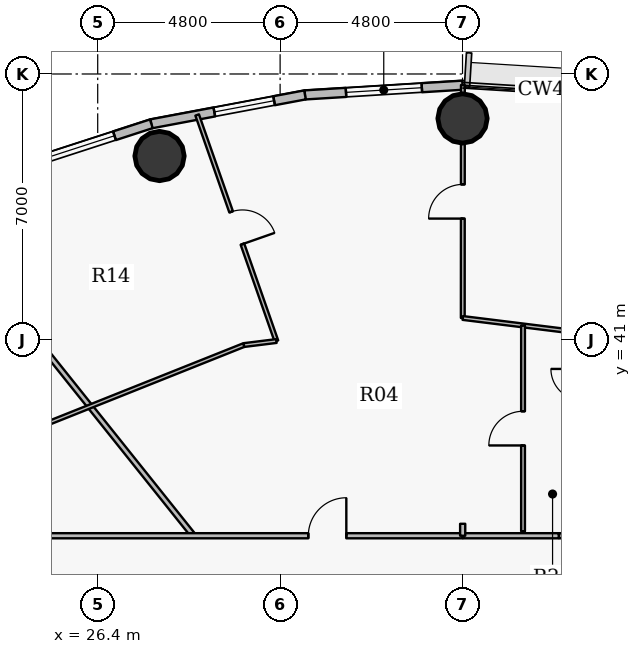
"""IFC4 building model, lengths in metres.
Left out: names, types, materials, properties, quantities, classifications, styles, units other than length and angle.
Written with IfcOpenShell. Run it as: python <this file> out.ifc"""

import sys

from ifc_helpers import new_model, si_unit, direction, frame, frame_2d, origin, origin_2d, place, context, subcontext, project, spatial, rectangle, hollow_circle, extrude, source, transform, mapped, element, fill, save


model = new_model("IFC4")
c1 = context("Model", 3, precision=1e-05, world=origin(), true_north=direction((0.0, 1.0)))
c2 = subcontext(c1, "Body", "Model", "MODEL_VIEW")
j1 = project(units=[si_unit("LENGTHUNIT", "METRE"), si_unit("PLANEANGLEUNIT", "RADIAN")], contexts=[c1])
p1 = place(None, origin())
s1 = spatial("IfcSite", under=j1, at=p1, CompositionType="ELEMENT")
p2 = place(p1, origin())
s2 = spatial("IfcBuilding", under=s1, at=p2, CompositionType="ELEMENT")
p3 = place(p2, frame((0.0, 0.0, 178.65)))
s3 = spatial("IfcBuildingStorey", under=s2, at=p3, CompositionType="ELEMENT", Elevation=178.65)
for number, where, z_axis, x_axis in (
    (1, (36.0, 46.83, 0.0), (0.0, 0.0, 1.0), (1.0, 0.0, 0.0)),
    (2, (28.027, 45.841, 0.0), (0.0, 0.0, 1.0), (1.0, 0.0, 0.0)),
):
    element("IfcColumn", number, at=place(p3, frame(where, z_axis=z_axis, x_axis=x_axis)), inside=s3, PredefinedType="COLUMN", context=c2, shape_type="SweptSolid", body=[
        extrude(hollow_circle(Radius=0.65, WallThickness=0.04, at=origin_2d()), origin(), (0.0, 0.0, 1.0), 3.75),
    ])
p4 = place(p3, frame((31.854, 47.449, 0.0), z_axis=(0.0, 0.0, 1.0), x_axis=(0.998104600619, 0.061540281305, 0.0)))
e3 = element("IfcWall", 3, at=p4, inside=s3, PredefinedType="SOLIDWALL", context=c2, shape_type="SweptSolid", body=[
    extrude(rectangle(XDim=4.154, YDim=0.24, at=frame_2d((2.077, 0.0))), origin(), (0.0, 0.0, 1.0), 3.5),
])
p5 = place(p4, frame((1.082, 0.0, 0.9)))
e4 = element("IfcOpeningElement", 4, at=p5, cuts=e3, PredefinedType="OPENING", context=c2, shape_type="SweptSolid", body=[
    extrude(rectangle(XDim=2.0, YDim=1.75, at=origin_2d()), frame((1.0, 0.13, 0.875), z_axis=(0.0, -1.0, 0.0), x_axis=(1.0, 0.0, 0.0)), (0.0, 0.0, 1.0), 0.26),
])
p6 = place(p3, frame((27.811, 46.689, 0.0), z_axis=(0.0, 0.0, 1.0), x_axis=(0.982788108205, 0.184736391573, 0.0)))
e5 = element("IfcWall", 5, at=p6, inside=s3, PredefinedType="SOLIDWALL", context=c2, shape_type="SweptSolid", body=[
    extrude(rectangle(XDim=4.114, YDim=0.24, at=frame_2d((2.057, 0.0))), origin(), (0.0, 0.0, 1.0), 3.5),
])
p7 = place(p6, frame((1.687, 0.0, 0.9)))
e6 = element("IfcOpeningElement", 6, at=p7, cuts=e5, PredefinedType="OPENING", context=c2, shape_type="SweptSolid", body=[
    extrude(rectangle(XDim=1.6, YDim=1.75, at=origin_2d()), frame((0.8, 0.13, 0.875), z_axis=(0.0, -1.0, 0.0), x_axis=(1.0, 0.0, 0.0)), (0.0, 0.0, 1.0), 0.26),
])
p8 = place(p3, frame((23.97, 45.444, 0.0), z_axis=(0.0, 0.0, 1.0), x_axis=(0.951209870236, 0.30854462038, 0.0)))
e7 = element("IfcWall", 7, at=p8, inside=s3, PredefinedType="SOLIDWALL", context=c2, shape_type="SweptSolid", body=[
    extrude(rectangle(XDim=4.038, YDim=0.24, at=frame_2d((2.019, 0.0))), origin(), (0.0, 0.0, 1.0), 3.5),
])
p9 = place(p8, frame((1.019, 0.0, 0.9)))
e8 = element("IfcOpeningElement", 8, at=p9, cuts=e7, PredefinedType="OPENING", context=c2, shape_type="SweptSolid", body=[
    extrude(rectangle(XDim=2.0, YDim=1.75, at=origin_2d()), frame((1.0, 0.13, 0.875), z_axis=(0.0, -1.0, 0.0), x_axis=(1.0, 0.0, 0.0)), (0.0, 0.0, 1.0), 0.26),
])
p10 = place(p3, frame((21.999, 44.503, 0.0), z_axis=(0.0, 0.0, 1.0), x_axis=(0.624673551917, -0.780886005468, 0.0)))
e9 = element("IfcWall", 9, at=p10, inside=s3, PredefinedType="PARTITIONING", context=c2, shape_type="SweptSolid", body=[
    extrude(rectangle(XDim=11.081, YDim=0.135, at=frame_2d((5.541, 0.0))), origin(), (0.0, 0.0, 1.0), 2.935),
])
p11 = place(p3, frame((24.35, 35.85, 0.0), z_axis=(0.0, 0.0, 1.0), x_axis=(1.0, 0.0, 0.0)))
e10 = element("IfcWall", 10, at=p11, inside=s3, PredefinedType="PARTITIONING", context=c2, shape_type="SweptSolid", body=[
    extrude(rectangle(XDim=11.654, YDim=0.135, at=frame_2d((5.827, 0.0))), origin(), (0.0, 0.0, 1.0), 2.935),
])
p12 = place(p11, frame((7.592, 0.0, 0.0)))
e11 = element("IfcOpeningElement", 11, at=p12, cuts=e10, PredefinedType="OPENING", context=c2, shape_type="SweptSolid", body=[
    extrude(rectangle(XDim=1.0, YDim=2.15, at=origin_2d()), frame((0.5, 0.078, 1.075), z_axis=(0.0, -1.0, 0.0), x_axis=(1.0, 0.0, 0.0)), (0.0, 0.0, 1.0), 0.155),
])
p13 = place(p3, frame((25.055, 38.796, 0.0), z_axis=(0.0, 0.0, 1.0), x_axis=(0.928798710424, 0.370584613166, 0.0)))
e12 = element("IfcWall", 12, at=p13, inside=s3, PredefinedType="PARTITIONING", context=c2, shape_type="SweptSolid", body=[
    extrude(rectangle(XDim=5.589, YDim=0.1, at=frame_2d((2.794, 0.0))), origin(), (0.0, 0.0, 1.0), 2.935),
])
p14 = place(p3, frame((29.018, 46.921, 0.0), z_axis=(0.0, 0.0, 1.0), x_axis=(0.330774858624, -0.943709697366, 0.0)))
e13 = element("IfcWall", 13, at=p14, inside=s3, PredefinedType="PARTITIONING", context=c2, shape_type="SweptSolid", body=[
    extrude(rectangle(XDim=6.302, YDim=0.1, at=frame_2d((3.151, 0.0))), origin(), (0.0, 0.0, 1.0), 2.935),
])
p15 = place(p14, frame((2.701, 0.0, 0.0)))
e14 = element("IfcOpeningElement", 14, at=p15, cuts=e13, PredefinedType="OPENING", context=c2, shape_type="SweptSolid", body=[
    extrude(rectangle(XDim=0.9, YDim=2.1, at=origin_2d()), frame((0.45, 0.06, 1.05), z_axis=(0.0, -1.0, 0.0), x_axis=(1.0, 0.0, 0.0)), (0.0, 0.0, 1.0), 0.12),
])
p16 = place(p3, frame((30.246, 40.867, 0.0), z_axis=(0.0, 0.0, 1.0), x_axis=(0.992394974801, 0.123094329637, 0.0)))
e15 = element("IfcWall", 15, at=p16, inside=s3, PredefinedType="PARTITIONING", context=c2, shape_type="SweptSolid", body=[
    extrude(rectangle(XDim=0.863, YDim=0.1, at=frame_2d((0.431, 0.0))), origin(), (0.0, 0.0, 1.0), 2.935),
])
p17 = place(p3, frame((36.007, 41.58, 0.0), z_axis=(0.0, 0.0, 1.0), x_axis=(0.000477973338, 0.999999885771, 0.0)))
e16 = element("IfcWall", 16, at=p17, inside=s3, PredefinedType="PARTITIONING", context=c2, shape_type="SweptSolid", body=[
    extrude(rectangle(XDim=6.129, YDim=0.1, at=frame_2d((3.065, 0.0))), origin(), (0.0, 0.0, 1.0), 2.935),
])
p18 = place(p17, frame((2.615, 0.0, 0.0)))
e17 = element("IfcOpeningElement", 17, at=p18, cuts=e16, PredefinedType="OPENING", context=c2, shape_type="SweptSolid", body=[
    extrude(rectangle(XDim=0.9, YDim=2.1, at=origin_2d()), frame((0.45, 0.06, 1.05), z_axis=(0.0, -1.0, 0.0), x_axis=(1.0, 0.0, 0.0)), (0.0, 0.0, 1.0), 0.12),
])
p19 = place(p3, frame((36.007, 41.58, 0.0), z_axis=(0.0, 0.0, 1.0), x_axis=(0.992395965764, -0.123086340169, 0.0)))
e18 = element("IfcWall", 18, at=p19, inside=s3, PredefinedType="PARTITIONING", context=c2, shape_type="SweptSolid", body=[
    extrude(rectangle(XDim=4.943, YDim=0.1, at=frame_2d((2.471, 0.0))), origin(), (0.0, 0.0, 1.0), 2.935),
])
p20 = place(p3, frame((37.592, 35.968, 0.0), z_axis=(0.0, 0.0, 1.0), x_axis=(0.0, 1.0, 0.0)))
e19 = element("IfcWall", 19, at=p20, inside=s3, PredefinedType="PARTITIONING", context=c2, shape_type="SweptSolid", body=[
    extrude(rectangle(XDim=5.416, YDim=0.1, at=frame_2d((2.708, 0.0))), origin(), (0.0, 0.0, 1.0), 3.5),
])
p21 = place(p20, frame((2.258, 0.0, 0.0)))
e20 = element("IfcOpeningElement", 20, at=p21, cuts=e19, PredefinedType="OPENING", context=c2, shape_type="SweptSolid", body=[
    extrude(rectangle(XDim=0.9, YDim=2.1, at=origin_2d()), frame((0.45, 0.06, 1.05), z_axis=(0.0, -1.0, 0.0), x_axis=(1.0, 0.0, 0.0)), (0.0, 0.0, 1.0), 0.12),
])
p22 = place(p3, frame((38.541, 35.85, 0.0), z_axis=(0.0, 0.0, 1.0), x_axis=(1.0, 0.0, 0.0)))
e21 = element("IfcWall", 21, at=p22, inside=s3, PredefinedType="PARTITIONING", context=c2, shape_type="SweptSolid", body=[
    extrude(rectangle(XDim=14.913, YDim=0.135, at=frame_2d((7.456, 0.0))), origin(), (0.0, 0.0, 1.0), 2.935),
])
p23 = place(p22, frame((5.868, 0.0, 0.0)))
e22 = element("IfcOpeningElement", 22, at=p23, cuts=e21, PredefinedType="OPENING", context=c2, shape_type="SweptSolid", body=[
    extrude(rectangle(XDim=1.0, YDim=2.15, at=origin_2d()), frame((0.5, 0.078, 1.075), z_axis=(0.0, -1.0, 0.0), x_axis=(1.0, 0.0, 0.0)), (0.0, 0.0, 1.0), 0.155),
])
p24 = place(p3, frame((36.014, 35.85, 0.0), z_axis=(0.0, 0.0, 1.0), x_axis=(1.0, 0.0, 0.0)))
e23 = element("IfcWall", 23, at=p24, inside=s3, PredefinedType="PARTITIONING", context=c2, shape_type="SweptSolid", body=[
    extrude(rectangle(XDim=2.517, YDim=0.135, at=frame_2d((1.259, 0.0))), origin(), (0.0, 0.0, 1.0), 2.935),
])
p25 = place(p3, frame((36.004, 36.165, 0.0), z_axis=(0.0, 0.0, 1.0), x_axis=(0.0, -1.0, 0.0)))
e24 = element("IfcWall", 24, at=p25, inside=s3, PredefinedType="PARTITIONING", context=c2, shape_type="SweptSolid", body=[
    extrude(rectangle(XDim=0.315, YDim=0.135, at=frame_2d((0.157, 0.0))), origin(), (0.0, 0.0, 1.0), 2.935),
])
m1 = source(origin(), c2, "Body", "SweptSolid", [
    extrude(rectangle(XDim=2.0, YDim=1.75, at=origin_2d()), frame((1.0, 0.03, 0.875), z_axis=(0.0, -1.0, 0.0), x_axis=(1.0, 0.0, 0.0)), (0.0, 0.0, 1.0), 0.06),
])
p26 = place(p5, origin())
e25 = element("IfcWindow", 25, at=p26, inside=s3, PartitioningType="DOUBLE_PANEL_VERTICAL", PredefinedType="WINDOW", context=c2, shape_type="MappedRepresentation", body=[
    mapped(m1, transform((0.0, 0.0, 0.0), x_axis=(1.0, 0.0, 0.0), y_axis=(0.0, 1.0, 0.0), z_axis=(0.0, 0.0, 1.0), scale=1.0)),
])
fill(e4, e25)
m2 = source(origin(), c2, "Body", "SweptSolid", [
    extrude(rectangle(XDim=1.6, YDim=1.75, at=origin_2d()), frame((0.8, 0.03, 0.875), z_axis=(0.0, -1.0, 0.0), x_axis=(1.0, 0.0, 0.0)), (0.0, 0.0, 1.0), 0.06),
])
p27 = place(p7, origin())
e26 = element("IfcWindow", 26, at=p27, inside=s3, PartitioningType="DOUBLE_PANEL_VERTICAL", PredefinedType="WINDOW", context=c2, shape_type="MappedRepresentation", body=[
    mapped(m2, transform((0.0, 0.0, 0.0), x_axis=(1.0, 0.0, 0.0), y_axis=(0.0, 1.0, 0.0), z_axis=(0.0, 0.0, 1.0), scale=1.0)),
])
fill(e6, e26)
p28 = place(p9, origin())
e27 = element("IfcWindow", 27, at=p28, inside=s3, PartitioningType="DOUBLE_PANEL_VERTICAL", PredefinedType="WINDOW", context=c2, shape_type="MappedRepresentation", body=[
    mapped(m1, transform((0.0, 0.0, 0.0), x_axis=(1.0, 0.0, 0.0), y_axis=(0.0, 1.0, 0.0), z_axis=(0.0, 0.0, 1.0), scale=1.0)),
])
fill(e8, e27)
m3 = source(origin(), c2, "Body", "SweptSolid", [
    extrude(rectangle(XDim=1.0, YDim=2.15, at=origin_2d()), frame((0.5, 0.025, 1.075), z_axis=(0.0, -1.0, 0.0), x_axis=(1.0, 0.0, 0.0)), (0.0, 0.0, 1.0), 0.05),
])
p29 = place(p12, origin())
e28 = element("IfcDoor", 28, at=p29, inside=s3, OperationType="SINGLE_SWING_RIGHT", PredefinedType="DOOR", context=c2, shape_type="MappedRepresentation", body=[
    mapped(m3, transform((0.0, 0.0, 0.0), x_axis=(1.0, 0.0, 0.0), y_axis=(0.0, 1.0, 0.0), z_axis=(0.0, 0.0, 1.0), scale=1.0)),
])
fill(e11, e28)
m4 = source(origin(), c2, "Body", "SweptSolid", [
    extrude(rectangle(XDim=0.9, YDim=2.1, at=origin_2d()), frame((0.45, 0.025, 1.05), z_axis=(0.0, -1.0, 0.0), x_axis=(1.0, 0.0, 0.0)), (0.0, 0.0, 1.0), 0.05),
])
p30 = place(p18, origin())
e29 = element("IfcDoor", 29, at=p30, inside=s3, OperationType="SINGLE_SWING_LEFT", PredefinedType="DOOR", context=c2, shape_type="MappedRepresentation", body=[
    mapped(m4, transform((0.0, 0.0, 0.0), x_axis=(1.0, 0.0, 0.0), y_axis=(0.0, 1.0, 0.0), z_axis=(0.0, 0.0, 1.0), scale=1.0)),
])
fill(e17, e29)
p31 = place(p15, origin())
e30 = element("IfcDoor", 30, at=p31, inside=s3, OperationType="SINGLE_SWING_RIGHT", PredefinedType="DOOR", context=c2, shape_type="MappedRepresentation", body=[
    mapped(m4, transform((0.0, 0.0, 0.0), x_axis=(1.0, 0.0, 0.0), y_axis=(0.0, 1.0, 0.0), z_axis=(0.0, 0.0, 1.0), scale=1.0)),
])
fill(e14, e30)
p32 = place(p21, origin())
e31 = element("IfcDoor", 31, at=p32, inside=s3, OperationType="SINGLE_SWING_LEFT", PredefinedType="DOOR", context=c2, shape_type="MappedRepresentation", body=[
    mapped(m4, transform((0.0, 0.0, 0.0), x_axis=(1.0, 0.0, 0.0), y_axis=(0.0, 1.0, 0.0), z_axis=(0.0, 0.0, 1.0), scale=1.0)),
])
fill(e20, e31)
save(model, sys.argv[1])
